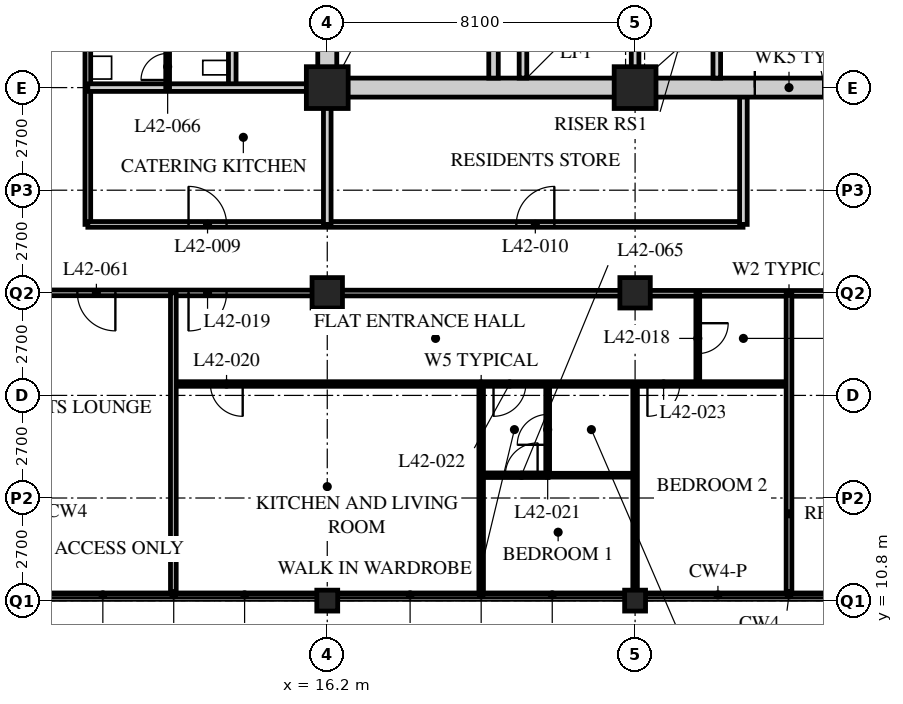
"""IFC4 building model, lengths in metres.
Left out: names, types, materials, properties, quantities, classifications, styles, units other than length and angle.
Written with IfcOpenShell. Run it as: python <this file> out.ifc"""

import sys

from ifc_helpers import new_model, si_unit, direction, frame, frame_2d, origin, origin_2d, place, context, subcontext, project, spatial, rectangle, hollow_rectangle, extrude, element, fill, save


model = new_model("IFC4")
c1 = context("Model", 3, precision=1e-05, world=origin(), true_north=direction((0.0, 1.0)))
c2 = subcontext(c1, "Body", "Model", "MODEL_VIEW")
j1 = project(units=[si_unit("LENGTHUNIT", "METRE"), si_unit("PLANEANGLEUNIT", "RADIAN")], contexts=[c1])
p1 = place(None, origin())
s1 = spatial("IfcSite", under=j1, at=p1, CompositionType="ELEMENT")
p2 = place(p1, origin())
s2 = spatial("IfcBuilding", under=s1, at=p2, CompositionType="ELEMENT")
p3 = place(p2, frame((0.0, 0.0, 165.0)))
s3 = spatial("IfcBuildingStorey", under=s2, at=p3, CompositionType="ELEMENT", Elevation=165.0)
p4 = place(p3, frame((16.2, 10.8, 0.0), z_axis=(0.0, 0.0, 1.0), x_axis=(1.0, 0.0, 0.0)))
e1 = element("IfcColumn", 1, at=p4, inside=s3, PredefinedType="COLUMN", context=c2, shape_type="SweptSolid", body=[
    extrude(hollow_rectangle(XDim=0.55, YDim=0.55, WallThickness=0.04, at=origin_2d()), origin(), (0.0, 0.0, 1.0), 5.4),
])
p5 = place(p3, frame((16.2, 18.9, 0.0), z_axis=(0.0, 0.0, 1.0), x_axis=(1.0, 0.0, 0.0)))
e2 = element("IfcColumn", 2, at=p5, inside=s3, PredefinedType="COLUMN", context=c2, shape_type="SweptSolid", body=[
    extrude(hollow_rectangle(XDim=0.8, YDim=0.8, WallThickness=0.08, at=origin_2d()), origin(), (0.0, 0.0, 1.0), 5.4),
])
p6 = place(p3, frame((16.2, 24.3, 0.0), z_axis=(0.0, 0.0, 1.0), x_axis=(1.0, 0.0, 0.0)))
e3 = element("IfcColumn", 3, at=p6, inside=s3, PredefinedType="COLUMN", context=c2, shape_type="SweptSolid", body=[
    extrude(hollow_rectangle(XDim=1.1, YDim=1.1, WallThickness=0.1, at=origin_2d()), origin(), (0.0, 0.0, 1.0), 5.4),
])
p7 = place(p3, frame((24.3, 10.8, 0.0), z_axis=(0.0, 0.0, 1.0), x_axis=(1.0, 0.0, 0.0)))
e4 = element("IfcColumn", 4, at=p7, inside=s3, PredefinedType="COLUMN", context=c2, shape_type="SweptSolid", body=[
    extrude(hollow_rectangle(XDim=0.55, YDim=0.55, WallThickness=0.04, at=origin_2d()), origin(), (0.0, 0.0, 1.0), 5.4),
])
p8 = place(p3, frame((24.3, 18.9, 0.0), z_axis=(0.0, 0.0, 1.0), x_axis=(1.0, 0.0, 0.0)))
e5 = element("IfcColumn", 5, at=p8, inside=s3, PredefinedType="COLUMN", context=c2, shape_type="SweptSolid", body=[
    extrude(hollow_rectangle(XDim=0.8, YDim=0.8, WallThickness=0.08, at=origin_2d()), origin(), (0.0, 0.0, 1.0), 5.4),
])
p9 = place(p3, frame((24.3, 24.3, 0.0), z_axis=(0.0, 0.0, 1.0), x_axis=(1.0, 0.0, 0.0)))
e6 = element("IfcColumn", 6, at=p9, inside=s3, PredefinedType="COLUMN", context=c2, shape_type="SweptSolid", body=[
    extrude(hollow_rectangle(XDim=1.1, YDim=1.1, WallThickness=0.1, at=origin_2d()), origin(), (0.0, 0.0, 1.0), 5.4),
])
p10 = place(p3, frame((8.1, 18.9, 0.0), z_axis=(0.0, 0.0, 1.0), x_axis=(0.999999729567, -0.000735435758, 0.0)))
e7 = element("IfcWall", 7, at=p10, inside=s3, PredefinedType="PARTITIONING", context=c2, shape_type="SweptSolid", body=[
    extrude(rectangle(XDim=40.5, YDim=0.15, at=frame_2d((20.25, 0.0))), origin(), (0.0, 0.0, 1.0), 4.42),
])
p11 = place(p10, frame((4.45, 0.0, 0.0)))
e8 = element("IfcOpeningElement", 8, at=p11, cuts=e7, PredefinedType="OPENING", context=c2, shape_type="SweptSolid", body=[
    extrude(rectangle(XDim=1.0, YDim=2.1, at=frame_2d((0.5, 1.05))), frame((0.0, 0.085, 0.0), z_axis=(0.0, -1.0, 0.0), x_axis=(1.0, 0.0, 0.0)), (0.0, 0.0, 1.0), 0.17),
])
p12 = place(p10, frame((25.15, 0.0, 0.0)))
e9 = element("IfcOpeningElement", 9, at=p12, cuts=e7, PredefinedType="OPENING", context=c2, shape_type="SweptSolid", body=[
    extrude(rectangle(XDim=1.8, YDim=2.4, at=frame_2d((0.9, 1.2))), frame((0.0, 0.085, 0.0), z_axis=(0.0, -1.0, 0.0), x_axis=(1.0, 0.0, 0.0)), (0.0, 0.0, 1.0), 0.17),
])
p13 = place(p10, frame((29.875, 0.0, 0.0)))
e10 = element("IfcOpeningElement", 10, at=p13, cuts=e7, PredefinedType="OPENING", context=c2, shape_type="SweptSolid", body=[
    extrude(rectangle(XDim=1.0, YDim=2.1, at=frame_2d((0.5, 1.05))), frame((0.0, 0.085, 0.0), z_axis=(0.0, -1.0, 0.0), x_axis=(1.0, 0.0, 0.0)), (0.0, 0.0, 1.0), 0.17),
])
p14 = place(p10, frame((34.75, 0.0, 0.0)))
e11 = element("IfcOpeningElement", 11, at=p14, cuts=e7, PredefinedType="OPENING", context=c2, shape_type="SweptSolid", body=[
    extrude(rectangle(XDim=1.0, YDim=2.1, at=frame_2d((0.5, 1.05))), frame((0.0, 0.085, 0.0), z_axis=(0.0, -1.0, 0.0), x_axis=(1.0, 0.0, 0.0)), (0.0, 0.0, 1.0), 0.17),
])
p15 = place(p10, frame((1.525, 0.0, 0.0)))
e12 = element("IfcOpeningElement", 12, at=p15, cuts=e7, PredefinedType="OPENING", context=c2, shape_type="SweptSolid", body=[
    extrude(rectangle(XDim=1.0, YDim=2.1, at=frame_2d((0.5, 1.05))), frame((0.0, 0.085, 0.0), z_axis=(0.0, -1.0, 0.0), x_axis=(1.0, 0.0, 0.0)), (0.0, 0.0, 1.0), 0.17),
])
p16 = place(p10, frame((37.975, 0.0, 0.0)))
e13 = element("IfcOpeningElement", 13, at=p16, cuts=e7, PredefinedType="OPENING", context=c2, shape_type="SweptSolid", body=[
    extrude(rectangle(XDim=1.0, YDim=2.1, at=frame_2d((0.5, 1.05))), frame((0.0, 0.085, 0.0), z_axis=(0.0, -1.0, 0.0), x_axis=(1.0, 0.0, 0.0)), (0.0, 0.0, 1.0), 0.17),
])
p17 = place(p3, frame((9.9, 49.5, 0.0), z_axis=(0.0, 0.0, 1.0), x_axis=(0.0, -1.0, 0.0)))
e14 = element("IfcWall", 14, at=p17, inside=s3, PredefinedType="PARTITIONING", context=c2, shape_type="SweptSolid", body=[
    extrude(rectangle(XDim=28.8, YDim=0.15, at=frame_2d((14.4, 0.0))), origin(), (0.0, 0.0, 1.0), 5.19),
])
p18 = place(p17, frame((22.375, 0.0, 0.0)))
e15 = element("IfcOpeningElement", 15, at=p18, cuts=e14, PredefinedType="OPENING", context=c2, shape_type="SweptSolid", body=[
    extrude(rectangle(XDim=0.85, YDim=2.1, at=frame_2d((0.425, 1.05))), frame((0.0, 0.085, 0.0), z_axis=(0.0, -1.0, 0.0), x_axis=(1.0, 0.0, 0.0)), (0.0, 0.0, 1.0), 0.17),
])
p19 = place(p17, frame((18.25, 0.0, 0.0)))
e16 = element("IfcOpeningElement", 16, at=p19, cuts=e14, PredefinedType="OPENING", context=c2, shape_type="SweptSolid", body=[
    extrude(rectangle(XDim=1.0, YDim=2.1, at=frame_2d((0.5, 1.05))), frame((0.0, 0.085, 0.0), z_axis=(0.0, -1.0, 0.0), x_axis=(1.0, 0.0, 0.0)), (0.0, 0.0, 1.0), 0.17),
])
p20 = place(p17, frame((13.875, 0.0, 0.0)))
e17 = element("IfcOpeningElement", 17, at=p20, cuts=e14, PredefinedType="OPENING", context=c2, shape_type="SweptSolid", body=[
    extrude(rectangle(XDim=0.85, YDim=2.1, at=frame_2d((0.425, 1.05))), frame((0.0, 0.085, 0.0), z_axis=(0.0, -1.0, 0.0), x_axis=(1.0, 0.0, 0.0)), (0.0, 0.0, 1.0), 0.17),
])
p21 = place(p17, frame((9.75, 0.0, 0.0)))
e18 = element("IfcOpeningElement", 18, at=p21, cuts=e14, PredefinedType="OPENING", context=c2, shape_type="SweptSolid", body=[
    extrude(rectangle(XDim=1.0, YDim=2.1, at=frame_2d((0.5, 1.05))), frame((0.0, 0.085, 0.0), z_axis=(0.0, -1.0, 0.0), x_axis=(1.0, 0.0, 0.0)), (0.0, 0.0, 1.0), 0.17),
])
p22 = place(p3, frame((9.9, 20.7, 0.0), z_axis=(0.0, 0.0, 1.0), x_axis=(1.0, 0.0, 0.0)))
e19 = element("IfcWall", 19, at=p22, inside=s3, PredefinedType="PARTITIONING", context=c2, shape_type="SweptSolid", body=[
    extrude(rectangle(XDim=17.24, YDim=0.15, at=frame_2d((8.62, 0.0))), origin(), (0.0, 0.0, 1.0), 5.19),
])
p23 = place(p22, frame((2.65, 0.0, 0.0)))
e20 = element("IfcOpeningElement", 20, at=p23, cuts=e19, PredefinedType="OPENING", context=c2, shape_type="SweptSolid", body=[
    extrude(rectangle(XDim=1.0, YDim=2.1, at=frame_2d((0.5, 1.05))), frame((0.0, 0.085, 0.0), z_axis=(0.0, -1.0, 0.0), x_axis=(1.0, 0.0, 0.0)), (0.0, 0.0, 1.0), 0.17),
])
p24 = place(p22, frame((11.275, 0.0, 0.0)))
e21 = element("IfcOpeningElement", 21, at=p24, cuts=e19, PredefinedType="OPENING", context=c2, shape_type="SweptSolid", body=[
    extrude(rectangle(XDim=1.0, YDim=2.1, at=frame_2d((0.5, 1.05))), frame((0.0, 0.085, 0.0), z_axis=(0.0, -1.0, 0.0), x_axis=(1.0, 0.0, 0.0)), (0.0, 0.0, 1.0), 0.17),
])
p25 = place(p3, frame((13.7, 24.3, 0.0), z_axis=(0.0, 0.0, 1.0), x_axis=(0.0, 1.0, 0.0)))
e22 = element("IfcWall", 22, at=p25, inside=s3, PredefinedType="SOLIDWALL", context=c2, shape_type="SweptSolid", body=[
    extrude(rectangle(XDim=4.8, YDim=0.2, at=frame_2d((2.4, 0.0))), origin(), (0.0, 0.0, 1.0), 5.19),
])
p26 = place(p3, frame((16.2, 20.7, 0.0), z_axis=(0.0, 0.0, 1.0), x_axis=(0.0, 1.0, 0.0)))
e23 = element("IfcWall", 23, at=p26, inside=s3, PredefinedType="SOLIDWALL", context=c2, shape_type="SweptSolid", body=[
    extrude(rectangle(XDim=3.6, YDim=0.2, at=frame_2d((1.8, 0.0))), origin(), (0.0, 0.0, 1.0), 4.42),
])
p27 = place(p3, frame((27.15, 20.7, 0.0), z_axis=(0.0, 0.0, 1.0), x_axis=(0.0, 1.0, 0.0)))
e24 = element("IfcWall", 24, at=p27, inside=s3, PredefinedType="SOLIDWALL", context=c2, shape_type="SweptSolid", body=[
    extrude(rectangle(XDim=3.6, YDim=0.2, at=frame_2d((1.8, 0.0))), origin(), (0.0, 0.0, 1.0), 5.19),
])
p28 = place(p3, frame((9.9, 24.3, 0.0), z_axis=(0.0, 0.0, 1.0), x_axis=(1.0, 0.0, 0.0)))
e25 = element("IfcWall", 25, at=p28, inside=s3, PredefinedType="SOLIDWALL", context=c2, shape_type="SweptSolid", body=[
    extrude(rectangle(XDim=6.3, YDim=0.2, at=frame_2d((3.15, 0.0))), origin(), (0.0, 0.0, 1.0), 5.19),
])
p29 = place(p3, frame((12.15, 16.5, 0.0), z_axis=(0.0, 0.0, 1.0), x_axis=(1.0, 0.0, 0.0)))
e26 = element("IfcWall", 26, at=p29, inside=s3, PredefinedType="PARTITIONING", context=c2, shape_type="SweptSolid", body=[
    extrude(rectangle(XDim=16.2, YDim=0.12, at=frame_2d((8.1, 0.0))), origin(), (0.0, 0.0, 1.0), 5.19),
])
p30 = place(p29, frame((0.975, 0.0, 0.0)))
e27 = element("IfcOpeningElement", 27, at=p30, cuts=e26, PredefinedType="OPENING", context=c2, shape_type="SweptSolid", body=[
    extrude(rectangle(XDim=0.85, YDim=2.1, at=frame_2d((0.425, 1.05))), frame((0.0, 0.07, 0.0), z_axis=(0.0, -1.0, 0.0), x_axis=(1.0, 0.0, 0.0)), (0.0, 0.0, 1.0), 0.14),
])
p31 = place(p29, frame((8.425, 0.0, 0.0)))
e28 = element("IfcOpeningElement", 28, at=p31, cuts=e26, PredefinedType="OPENING", context=c2, shape_type="SweptSolid", body=[
    extrude(rectangle(XDim=0.85, YDim=2.1, at=frame_2d((0.425, 1.05))), frame((0.0, 0.07, 0.0), z_axis=(0.0, -1.0, 0.0), x_axis=(1.0, 0.0, 0.0)), (0.0, 0.0, 1.0), 0.14),
])
p32 = place(p29, frame((12.475, 0.0, 0.0)))
e29 = element("IfcOpeningElement", 29, at=p32, cuts=e26, PredefinedType="OPENING", context=c2, shape_type="SweptSolid", body=[
    extrude(rectangle(XDim=0.85, YDim=2.1, at=frame_2d((0.425, 1.05))), frame((0.0, 0.07, 0.0), z_axis=(0.0, -1.0, 0.0), x_axis=(1.0, 0.0, 0.0)), (0.0, 0.0, 1.0), 0.14),
])
p33 = place(p3, frame((25.95, 18.9, 0.0), z_axis=(0.0, 0.0, 1.0), x_axis=(0.0, -1.0, 0.0)))
e30 = element("IfcWall", 30, at=p33, inside=s3, PredefinedType="PARTITIONING", context=c2, shape_type="SweptSolid", body=[
    extrude(rectangle(XDim=2.4, YDim=0.1, at=frame_2d((1.2, 0.0))), origin(), (0.0, 0.0, 1.0), 5.19),
])
p34 = place(p33, frame((0.8, 0.0, 0.0)))
e31 = element("IfcOpeningElement", 31, at=p34, cuts=e30, PredefinedType="OPENING", context=c2, shape_type="SweptSolid", body=[
    extrude(rectangle(XDim=0.8, YDim=2.1, at=frame_2d((0.4, 1.05))), frame((0.0, 0.06, 0.0), z_axis=(0.0, -1.0, 0.0), x_axis=(1.0, 0.0, 0.0)), (0.0, 0.0, 1.0), 0.12),
])
p35 = place(p3, frame((22.0, 16.5, 0.0), z_axis=(0.0, 0.0, 1.0), x_axis=(0.0, -1.0, 0.0)))
e32 = element("IfcWall", 32, at=p35, inside=s3, PredefinedType="PARTITIONING", context=c2, shape_type="SweptSolid", body=[
    extrude(rectangle(XDim=2.4, YDim=0.1, at=frame_2d((1.2, 0.0))), origin(), (0.0, 0.0, 1.0), 5.19),
])
p36 = place(p35, frame((0.8, 0.0, 0.0)))
e33 = element("IfcOpeningElement", 33, at=p36, cuts=e32, PredefinedType="OPENING", context=c2, shape_type="SweptSolid", body=[
    extrude(rectangle(XDim=0.8, YDim=2.1, at=frame_2d((0.4, 1.05))), frame((0.0, 0.06, 0.0), z_axis=(0.0, -1.0, 0.0), x_axis=(1.0, 0.0, 0.0)), (0.0, 0.0, 1.0), 0.12),
])
p37 = place(p3, frame((22.0, 14.1, 0.0), z_axis=(0.0, 0.0, 1.0), x_axis=(1.0, 0.0, 0.0)))
e34 = element("IfcWall", 34, at=p37, inside=s3, PredefinedType="PARTITIONING", context=c2, shape_type="SweptSolid", body=[
    extrude(rectangle(XDim=2.3, YDim=0.1, at=frame_2d((1.15, 0.0))), origin(), (0.0, 0.0, 1.0), 5.19),
])
p38 = place(p3, frame((20.25, 16.5, 0.0), z_axis=(0.0, 0.0, 1.0), x_axis=(0.0, -1.0, 0.0)))
e35 = element("IfcWall", 35, at=p38, inside=s3, PredefinedType="PARTITIONING", context=c2, shape_type="SweptSolid", body=[
    extrude(rectangle(XDim=5.465, YDim=0.12, at=frame_2d((2.732, 0.0))), origin(), (0.0, 0.0, 1.0), 5.19),
])
p39 = place(p3, frame((24.3, 16.5, 0.0), z_axis=(0.0, 0.0, 1.0), x_axis=(0.0, -1.0, 0.0)))
e36 = element("IfcWall", 36, at=p39, inside=s3, PredefinedType="PARTITIONING", context=c2, shape_type="SweptSolid", body=[
    extrude(rectangle(XDim=5.4, YDim=0.12, at=frame_2d((2.7, 0.0))), origin(), (0.0, 0.0, 1.0), 4.42),
])
for number, where, z_axis, x_axis in (
    (37, (28.35, 18.9, 0.0), (0.0, 0.0, 1.0), (0.0, -1.0, 0.0)),
    (38, (12.15, 18.9, 0.0), (0.0, 0.0, 1.0), (0.0, -1.0, 0.0)),
):
    element("IfcWall", number, at=place(p3, frame(where, z_axis=z_axis, x_axis=x_axis)), inside=s3, PredefinedType="PARTITIONING", context=c2, shape_type="SweptSolid", body=[
        extrude(rectangle(XDim=7.865, YDim=0.15, at=frame_2d((3.932, 0.0))), origin(), (0.0, 0.0, 1.0), 5.19),
    ])
p40 = place(p3, frame((22.01, 14.1, 0.0), z_axis=(0.0, 0.0, 1.0), x_axis=(-1.0, 0.0, 0.0)))
e39 = element("IfcWall", 39, at=p40, inside=s3, PredefinedType="PARTITIONING", context=c2, shape_type="SweptSolid", body=[
    extrude(rectangle(XDim=1.76, YDim=0.12, at=frame_2d((0.88, 0.0))), origin(), (0.0, 0.0, 1.0), 5.19),
])
p41 = place(p40, frame((0.275, 0.0, 0.0)))
e40 = element("IfcOpeningElement", 40, at=p41, cuts=e39, PredefinedType="OPENING", context=c2, shape_type="SweptSolid", body=[
    extrude(rectangle(XDim=0.85, YDim=2.1, at=frame_2d((0.425, 1.05))), frame((0.0, 0.07, 0.0), z_axis=(0.0, -1.0, 0.0), x_axis=(1.0, 0.0, 0.0)), (0.0, 0.0, 1.0), 0.14),
])
p42 = place(p3, frame((12.0, 24.3, 0.0), z_axis=(0.0, 0.0, 1.0), x_axis=(0.0, 1.0, 0.0)))
e41 = element("IfcWall", 41, at=p42, inside=s3, PredefinedType="PARTITIONING", context=c2, shape_type="SweptSolid", body=[
    extrude(rectangle(XDim=2.1, YDim=0.1, at=frame_2d((1.05, 0.0))), origin(), (0.0, 0.0, 1.0), 5.19),
])
p43 = place(p42, frame((0.2, 0.0, 0.0)))
e42 = element("IfcOpeningElement", 42, at=p43, cuts=e41, PredefinedType="OPENING", context=c2, shape_type="SweptSolid", body=[
    extrude(rectangle(XDim=0.7, YDim=2.0, at=frame_2d((0.35, 1.0))), frame((0.0, 0.06, 0.0), z_axis=(0.0, -1.0, 0.0), x_axis=(1.0, 0.0, 0.0)), (0.0, 0.0, 1.0), 0.12),
])
p44 = place(p42, frame((1.225, 0.0, 0.0)))
e43 = element("IfcOpeningElement", 43, at=p44, cuts=e41, PredefinedType="OPENING", context=c2, shape_type="SweptSolid", body=[
    extrude(rectangle(XDim=0.7, YDim=2.0, at=frame_2d((0.35, 1.0))), frame((0.0, 0.06, 0.0), z_axis=(0.0, -1.0, 0.0), x_axis=(1.0, 0.0, 0.0)), (0.0, 0.0, 1.0), 0.12),
])
p45 = place(p3, frame((15.95, 24.3, 0.0), z_axis=(0.0, 0.0, 1.0), x_axis=(1.0, 0.0, 0.0)))
e44 = element("IfcWall", 44, at=p45, inside=s3, PredefinedType="SOLIDWALL", context=c2, shape_type="SweptSolid", body=[
    extrude(rectangle(XDim=24.8, YDim=0.5, at=frame_2d((12.4, 0.0))), origin(), (0.0, 0.0, 1.0), 4.42),
])
p46 = place(p45, frame((11.5, 0.0, 0.0)))
e45 = element("IfcOpeningElement", 45, at=p46, cuts=e44, PredefinedType="OPENING", context=c2, shape_type="SweptSolid", body=[
    extrude(rectangle(XDim=1.8, YDim=2.4, at=frame_2d((0.9, 1.2))), frame((0.0, 0.26, 0.0), z_axis=(0.0, -1.0, 0.0), x_axis=(1.0, 0.0, 0.0)), (0.0, 0.0, 1.0), 0.52),
])
p47 = place(p3, frame((16.2, 24.55, 0.0), z_axis=(0.0, 0.0, 1.0), x_axis=(0.0, 1.0, 0.0)))
e46 = element("IfcWall", 46, at=p47, inside=s3, PredefinedType="SOLIDWALL", context=c2, shape_type="SweptSolid", body=[
    extrude(rectangle(XDim=15.7, YDim=0.5, at=frame_2d((7.85, 0.0))), origin(), (0.0, 0.0, 1.0), 4.42),
])
p48 = place(p3, frame((24.3, 24.55, 0.0), z_axis=(0.0, 0.0, 1.0), x_axis=(0.0, 1.0, 0.0)))
e47 = element("IfcWall", 47, at=p48, inside=s3, PredefinedType="SOLIDWALL", context=c2, shape_type="SweptSolid", body=[
    extrude(rectangle(XDim=7.75, YDim=0.2, at=frame_2d((3.875, 0.0))), origin(), (0.0, 0.0, 1.0), 4.578),
])
p49 = place(p48, frame((4.6, 0.0, 0.0)))
e48 = element("IfcOpeningElement", 48, at=p49, cuts=e47, PredefinedType="OPENING", context=c2, shape_type="SweptSolid", body=[
    extrude(rectangle(XDim=1.2, YDim=2.1, at=frame_2d((0.6, 1.05))), frame((0.0, 0.11, 0.0), z_axis=(0.0, -1.0, 0.0), x_axis=(1.0, 0.0, 0.0)), (0.0, 0.0, 1.0), 0.22),
])
p50 = place(p3, frame((20.575, 24.55, 0.0), z_axis=(0.0, 0.0, 1.0), x_axis=(0.0, 1.0, 0.0)))
e49 = element("IfcWall", 49, at=p50, inside=s3, PredefinedType="SOLIDWALL", context=c2, shape_type="SweptSolid", body=[
    extrude(rectangle(XDim=7.75, YDim=0.25, at=frame_2d((3.875, 0.0))), origin(), (0.0, 0.0, 1.0), 5.19),
])
p51 = place(p50, frame((6.2, 0.0, 0.0)))
e50 = element("IfcOpeningElement", 50, at=p51, cuts=e49, PredefinedType="OPENING", context=c2, shape_type="SweptSolid", body=[
    extrude(rectangle(XDim=1.2, YDim=2.1, at=frame_2d((0.6, 1.05))), frame((0.0, 0.135, 0.0), z_axis=(0.0, -1.0, 0.0), x_axis=(1.0, 0.0, 0.0)), (0.0, 0.0, 1.0), 0.27),
])
p52 = place(p3, frame((21.35, 24.55, 0.0), z_axis=(0.0, 0.0, 1.0), x_axis=(0.0, 1.0, 0.0)))
e51 = element("IfcWall", 51, at=p52, inside=s3, PredefinedType="SOLIDWALL", context=c2, shape_type="SweptSolid", body=[
    extrude(rectangle(XDim=2.6, YDim=0.2, at=frame_2d((1.3, 0.0))), origin(), (0.0, 0.0, 1.0), 5.19),
])
p53 = place(p3, frame((26.45, 24.55, 0.0), z_axis=(0.0, 0.0, 1.0), x_axis=(0.0, 1.0, 0.0)))
e52 = element("IfcWall", 52, at=p53, inside=s3, PredefinedType="SOLIDWALL", context=c2, shape_type="SweptSolid", body=[
    extrude(rectangle(XDim=1.6, YDim=0.2, at=frame_2d((0.8, 0.0))), origin(), (0.0, 0.0, 1.0), 5.19),
])
p54 = place(p23, origin())
e53 = element("IfcDoor", 53, at=p54, inside=s3, OperationType="SINGLE_SWING_LEFT", PredefinedType="DOOR", context=c2, shape_type="SweptSolid", body=[
    extrude(rectangle(XDim=1.0, YDim=2.1, at=frame_2d((0.5, 1.05))), frame((0.0, 0.025, 0.0), z_axis=(0.0, -1.0, 0.0), x_axis=(1.0, 0.0, 0.0)), (0.0, 0.0, 1.0), 0.05),
])
fill(e20, e53)
p55 = place(p24, origin())
e54 = element("IfcDoor", 54, at=p55, inside=s3, OperationType="SINGLE_SWING_RIGHT", PredefinedType="DOOR", context=c2, shape_type="SweptSolid", body=[
    extrude(rectangle(XDim=1.0, YDim=2.1, at=frame_2d((0.5, 1.05))), frame((0.0, 0.025, 0.0), z_axis=(0.0, -1.0, 0.0), x_axis=(1.0, 0.0, 0.0)), (0.0, 0.0, 1.0), 0.05),
])
fill(e21, e54)
p56 = place(p34, origin())
e55 = element("IfcDoor", 55, at=p56, inside=s3, OperationType="SINGLE_SWING_LEFT", PredefinedType="DOOR", context=c2, shape_type="SweptSolid", body=[
    extrude(rectangle(XDim=0.8, YDim=2.1, at=frame_2d((0.4, 1.05))), frame((0.0, 0.025, 0.0), z_axis=(0.0, -1.0, 0.0), x_axis=(1.0, 0.0, 0.0)), (0.0, 0.0, 1.0), 0.05),
])
fill(e31, e55)
p57 = place(p11, origin())
e56 = element("IfcDoor", 56, at=p57, inside=s3, OperationType="SINGLE_SWING_RIGHT", PredefinedType="DOOR", context=c2, shape_type="SweptSolid", body=[
    extrude(rectangle(XDim=1.0, YDim=2.1, at=frame_2d((0.5, 1.05))), frame((0.0, 0.025, 0.0), z_axis=(0.0, -1.0, 0.0), x_axis=(1.0, 0.0, 0.0)), (0.0, 0.0, 1.0), 0.05),
])
fill(e8, e56)
p58 = place(p30, origin())
e57 = element("IfcDoor", 57, at=p58, inside=s3, OperationType="SINGLE_SWING_LEFT", PredefinedType="DOOR", context=c2, shape_type="SweptSolid", body=[
    extrude(rectangle(XDim=0.85, YDim=2.1, at=frame_2d((0.425, 1.05))), frame((0.0, 0.025, 0.0), z_axis=(0.0, -1.0, 0.0), x_axis=(1.0, 0.0, 0.0)), (0.0, 0.0, 1.0), 0.05),
])
fill(e27, e57)
p59 = place(p36, origin())
e58 = element("IfcDoor", 58, at=p59, inside=s3, OperationType="SINGLE_SWING_LEFT", PredefinedType="DOOR", context=c2, shape_type="SweptSolid", body=[
    extrude(rectangle(XDim=0.8, YDim=2.1, at=frame_2d((0.4, 1.05))), frame((0.0, 0.025, 0.0), z_axis=(0.0, -1.0, 0.0), x_axis=(1.0, 0.0, 0.0)), (0.0, 0.0, 1.0), 0.05),
])
fill(e33, e58)
p60 = place(p31, origin())
e59 = element("IfcDoor", 59, at=p60, inside=s3, OperationType="SINGLE_SWING_RIGHT", PredefinedType="DOOR", context=c2, shape_type="SweptSolid", body=[
    extrude(rectangle(XDim=0.85, YDim=2.1, at=frame_2d((0.425, 1.05))), frame((0.0, 0.025, 0.0), z_axis=(0.0, -1.0, 0.0), x_axis=(1.0, 0.0, 0.0)), (0.0, 0.0, 1.0), 0.05),
])
fill(e28, e59)
p61 = place(p32, origin())
e60 = element("IfcDoor", 60, at=p61, inside=s3, OperationType="SINGLE_SWING_RIGHT", PredefinedType="DOOR", context=c2, shape_type="SweptSolid", body=[
    extrude(rectangle(XDim=0.85, YDim=2.1, at=frame_2d((0.425, 1.05))), frame((0.0, 0.025, 0.0), z_axis=(0.0, -1.0, 0.0), x_axis=(1.0, 0.0, 0.0)), (0.0, 0.0, 1.0), 0.05),
])
fill(e29, e60)
p62 = place(p15, origin())
e61 = element("IfcDoor", 61, at=p62, inside=s3, OperationType="SINGLE_SWING_LEFT", PredefinedType="DOOR", context=c2, shape_type="SweptSolid", body=[
    extrude(rectangle(XDim=1.0, YDim=2.1, at=frame_2d((0.5, 1.05))), frame((0.0, 0.025, 0.0), z_axis=(0.0, -1.0, 0.0), x_axis=(1.0, 0.0, 0.0)), (0.0, 0.0, 1.0), 0.05),
])
fill(e12, e61)
p63 = place(p41, origin())
e62 = element("IfcDoor", 62, at=p63, inside=s3, OperationType="SINGLE_SWING_RIGHT", PredefinedType="DOOR", context=c2, shape_type="SweptSolid", body=[
    extrude(rectangle(XDim=0.85, YDim=2.1, at=frame_2d((0.425, 1.05))), frame((0.0, 0.025, 0.0), z_axis=(0.0, -1.0, 0.0), x_axis=(1.0, 0.0, 0.0)), (0.0, 0.0, 1.0), 0.05),
])
fill(e40, e62)
p64 = place(p43, origin())
e63 = element("IfcDoor", 63, at=p64, inside=s3, OperationType="SINGLE_SWING_LEFT", PredefinedType="DOOR", context=c2, shape_type="SweptSolid", body=[
    extrude(rectangle(XDim=0.7, YDim=2.0, at=frame_2d((0.35, 1.0))), frame((0.0, 0.025, 0.0), z_axis=(0.0, -1.0, 0.0), x_axis=(1.0, 0.0, 0.0)), (0.0, 0.0, 1.0), 0.05),
])
fill(e42, e63)
p65 = place(p46, origin())
e64 = element("IfcDoor", 64, at=p65, inside=s3, OperationType="DOUBLE_DOOR_SINGLE_SWING", PredefinedType="DOOR", context=c2, shape_type="SweptSolid", body=[
    extrude(rectangle(XDim=1.8, YDim=2.4, at=frame_2d((0.9, 1.2))), frame((0.0, 0.025, 0.0), z_axis=(0.0, -1.0, 0.0), x_axis=(1.0, 0.0, 0.0)), (0.0, 0.0, 1.0), 0.05),
])
fill(e45, e64)
save(model, sys.argv[1])
